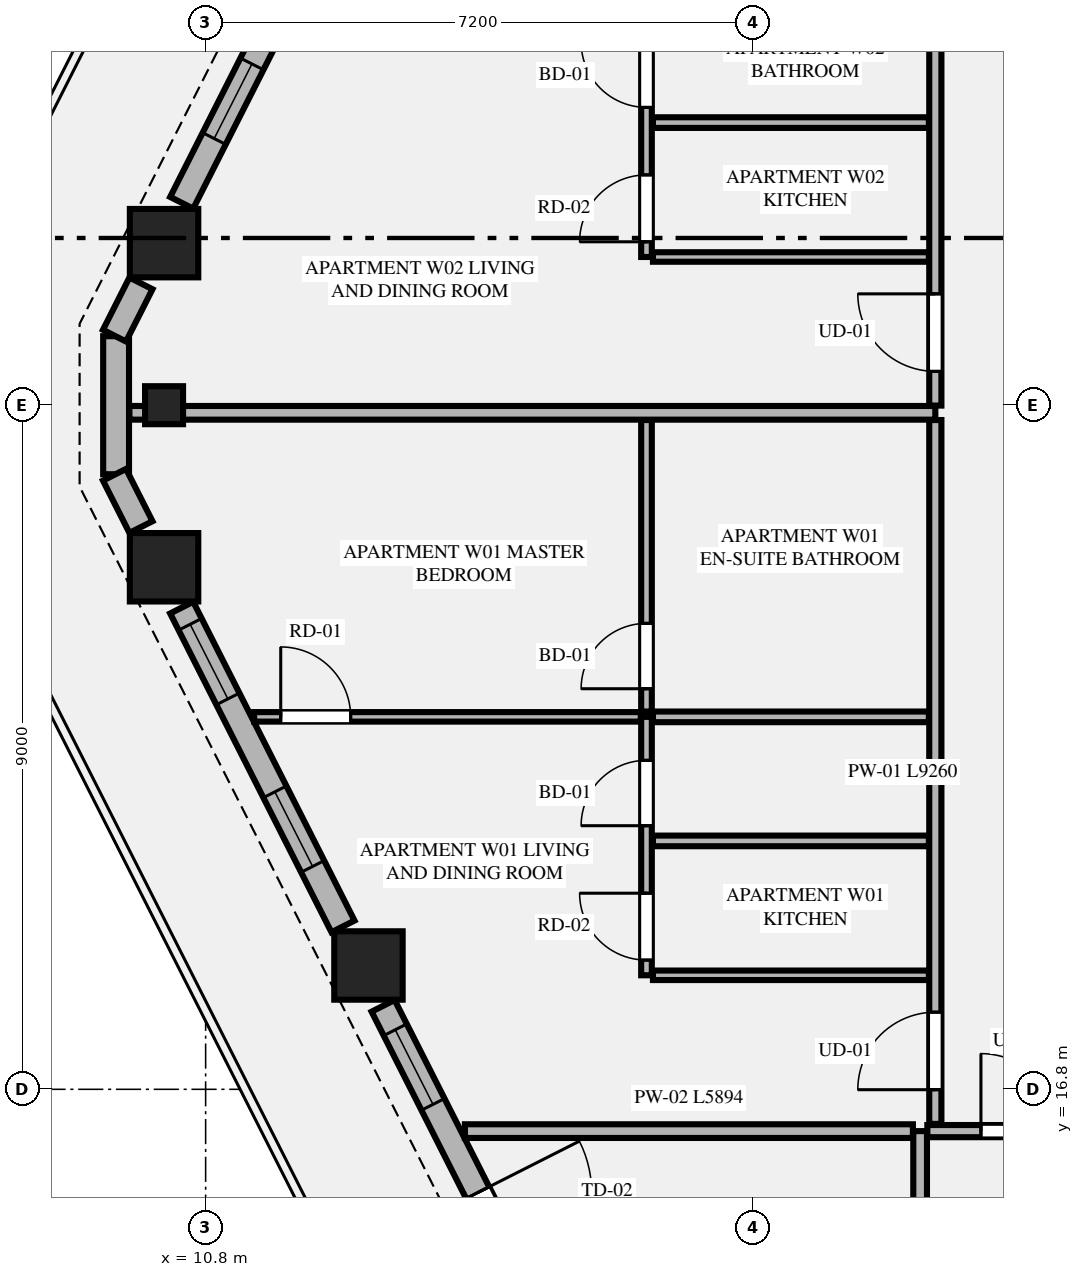
"""IFC4 building model, lengths in metres.
Left out: names, types, materials, properties, quantities, classifications, styles, units other than length and angle.
Written with IfcOpenShell. Run it as: python <this file> out.ifc"""

import sys

from ifc_helpers import new_model, si_unit, direction, frame, frame_2d, origin, origin_2d, place, context, subcontext, project, spatial, rectangle, extrude, element, fill, save


model = new_model("IFC4")
c1 = context("Model", 3, precision=1e-05, world=origin(), true_north=direction((0.0, 1.0)))
c2 = subcontext(c1, "Body", "Model", "MODEL_VIEW")
j1 = project(units=[si_unit("LENGTHUNIT", "METRE"), si_unit("PLANEANGLEUNIT", "RADIAN")], contexts=[c1])
p1 = place(None, origin())
s1 = spatial("IfcSite", under=j1, at=p1, CompositionType="ELEMENT")
p2 = place(p1, origin())
s2 = spatial("IfcBuilding", under=s1, at=p2, CompositionType="ELEMENT")
p3 = place(p2, frame((0.0, 0.0, 171.9)))
s3 = spatial("IfcBuildingStorey", under=s2, at=p3, CompositionType="ELEMENT", Elevation=171.9)
for number, where, z_axis, x_axis in (
    (1, (10.253, 27.932, 0.0), (0.0, 0.0, 1.0), (1.0, 0.0, 0.0)),
    (2, (10.253, 23.668, 0.0), (0.0, 0.0, 1.0), (1.0, 0.0, 0.0)),
    (3, (12.942, 18.429, 0.0), (0.0, 0.0, 1.0), (1.0, 0.0, 0.0)),
):
    element("IfcColumn", number, at=place(p3, frame(where, z_axis=z_axis, x_axis=x_axis)), inside=s3, PredefinedType="COLUMN", context=c2, shape_type="SweptSolid", body=[
        extrude(rectangle(XDim=0.9, YDim=0.9, at=origin_2d()), origin(), (0.0, 0.0, 1.0), 3.55),
    ])
p4 = place(p3, frame((10.253, 25.8, 0.0), z_axis=(0.0, 0.0, 1.0), x_axis=(0.0, -1.0, 0.0)))
e4 = element("IfcColumn", 4, at=p4, inside=s3, PredefinedType="PILASTER", context=c2, shape_type="SweptSolid", body=[
    extrude(rectangle(XDim=0.5, YDim=0.35, at=origin_2d()), origin(), (0.0, 0.0, 1.0), 3.55),
])
p5 = place(p3, frame((9.622, 26.708, 0.0), z_axis=(0.0, 0.0, 1.0), x_axis=(0.0, -1.0, 0.0)))
e5 = element("IfcWall", 5, at=p5, inside=s3, PredefinedType="STANDARD", context=c2, shape_type="SweptSolid", body=[
    extrude(rectangle(XDim=1.816, YDim=0.34, at=frame_2d((0.908, 0.0))), origin(), (0.0, 0.0, 1.0), 3.35),
])
p6 = place(p3, frame((12.607, 32.657, 0.0), z_axis=(0.0, 0.0, 1.0), x_axis=(-0.451426298588, -0.892308409096, 0.0)))
e6 = element("IfcWall", 6, at=p6, inside=s3, PredefinedType="STANDARD", context=c2, shape_type="SweptSolid", body=[
    extrude(rectangle(XDim=4.7, YDim=0.34, at=frame_2d((2.35, 0.0))), origin(), (0.0, 0.0, 1.0), 2.883),
])
p7 = place(p6, frame((0.22, 0.0, 0.75)))
e7 = element("IfcOpeningElement", 7, at=p7, cuts=e6, PredefinedType="OPENING", context=c2, shape_type="SweptSolid", body=[
    extrude(rectangle(XDim=1.027, YDim=1.983, at=frame_2d((0.514, 0.991))), frame((0.0, 0.18, 0.0), z_axis=(0.0, -1.0, 0.0), x_axis=(1.0, 0.0, 0.0)), (0.0, 0.0, 1.0), 0.36),
])
p8 = place(p6, frame((2.653, 0.0, 0.75)))
e8 = element("IfcOpeningElement", 8, at=p8, cuts=e6, PredefinedType="OPENING", context=c2, shape_type="SweptSolid", body=[
    extrude(rectangle(XDim=1.1, YDim=1.983, at=frame_2d((0.55, 0.991))), frame((0.0, 0.18, 0.0), z_axis=(0.0, -1.0, 0.0), x_axis=(1.0, 0.0, 0.0)), (0.0, 0.0, 1.0), 0.36),
])
for number, where, z_axis, x_axis in (
    (9, (9.949, 27.403, 0.0), (0.0, 0.0, 1.0), (-0.451, -0.892, 0.0)),
    (10, (9.601, 24.885, 0.0), (0.0, 0.0, 1.0), (0.451, -0.892, 0.0)),
):
    element("IfcWall", number, at=place(p3, frame(where, z_axis=z_axis, x_axis=x_axis)), inside=s3, PredefinedType="STANDARD", context=c2, shape_type="SweptSolid", body=[
        extrude(rectangle(XDim=0.771, YDim=0.34, at=frame_2d((0.385, 0.0))), origin(), (0.0, 0.0, 1.0), 3.35),
    ])
p9 = place(p3, frame((10.485, 23.137, 0.0), z_axis=(0.0, 0.0, 1.0), x_axis=(0.451447222193, -0.892297823361, 0.0)))
e11 = element("IfcWall", 11, at=p9, inside=s3, PredefinedType="STANDARD", context=c2, shape_type="SweptSolid", body=[
    extrude(rectangle(XDim=4.7, YDim=0.34, at=frame_2d((2.35, 0.0))), origin(), (0.0, 0.0, 1.0), 2.883),
])
p10 = place(p9, frame((0.246, 0.0, 0.75)))
e12 = element("IfcOpeningElement", 12, at=p10, cuts=e11, PredefinedType="OPENING", context=c2, shape_type="SweptSolid", body=[
    extrude(rectangle(XDim=1.1, YDim=1.983, at=frame_2d((0.55, 0.991))), frame((0.0, 0.18, 0.0), z_axis=(0.0, -1.0, 0.0), x_axis=(1.0, 0.0, 0.0)), (0.0, 0.0, 1.0), 0.36),
])
p11 = place(p9, frame((2.716, 0.0, 0.75)))
e13 = element("IfcOpeningElement", 13, at=p11, cuts=e11, PredefinedType="OPENING", context=c2, shape_type="SweptSolid", body=[
    extrude(rectangle(XDim=1.1, YDim=1.983, at=frame_2d((0.55, 0.991))), frame((0.0, 0.18, 0.0), z_axis=(0.0, -1.0, 0.0), x_axis=(1.0, 0.0, 0.0)), (0.0, 0.0, 1.0), 0.36),
])
p12 = place(p3, frame((13.135, 17.898, 0.0), z_axis=(0.0, 0.0, 1.0), x_axis=(0.451544279509, -0.892248711763, 0.0)))
e14 = element("IfcWall", 14, at=p12, inside=s3, PredefinedType="STANDARD", context=c2, shape_type="SweptSolid", body=[
    extrude(rectangle(XDim=4.91, YDim=0.34, at=frame_2d((2.455, 0.0))), origin(), (0.0, 0.0, 1.0), 2.883),
])
p13 = place(p12, frame((2.754, 0.0, 0.0)))
e15 = element("IfcOpeningElement", 15, at=p13, cuts=e14, PredefinedType="OPENING", context=c2, shape_type="SweptSolid", body=[
    extrude(rectangle(XDim=1.5, YDim=2.3, at=frame_2d((0.75, 1.15))), frame((0.0, 0.18, 0.0), z_axis=(0.0, -1.0, 0.0), x_axis=(1.0, 0.0, 0.0)), (0.0, 0.0, 1.0), 0.36),
])
p14 = place(p12, frame((0.353, 0.0, 0.75)))
e16 = element("IfcOpeningElement", 16, at=p14, cuts=e14, PredefinedType="OPENING", context=c2, shape_type="SweptSolid", body=[
    extrude(rectangle(XDim=1.1, YDim=1.983, at=frame_2d((0.55, 0.991))), frame((0.0, 0.18, 0.0), z_axis=(0.0, -1.0, 0.0), x_axis=(1.0, 0.0, 0.0)), (0.0, 0.0, 1.0), 0.36),
])
p15 = place(p3, frame((20.2, 5.968, 0.0), z_axis=(0.0, 0.0, 1.0), x_axis=(0.0, 1.0, 0.0)))
e17 = element("IfcWall", 17, at=p15, inside=s3, PredefinedType="PARTITIONING", context=c2, shape_type="SweptSolid", body=[
    extrude(rectangle(XDim=10.282, YDim=0.18, at=frame_2d((5.141, 0.0))), origin(), (0.0, 0.0, 1.0), 3.35),
])
p16 = place(p3, frame((20.295, 16.25, 0.0), z_axis=(0.0, 0.0, 1.0), x_axis=(1.0, 0.0, 0.0)))
e18 = element("IfcWall", 18, at=p16, inside=s3, PredefinedType="PARTITIONING", context=c2, shape_type="SweptSolid", body=[
    extrude(rectangle(XDim=8.467, YDim=0.16, at=frame_2d((4.233, 0.0))), origin(), (0.0, 0.0, 1.0), 3.35),
])
p17 = place(p16, frame((0.705, 0.0, 0.0)))
e19 = element("IfcOpeningElement", 19, at=p17, cuts=e18, PredefinedType="OPENING", context=c2, shape_type="SweptSolid", body=[
    extrude(rectangle(XDim=1.02, YDim=2.25, at=frame_2d((0.51, 1.125))), frame((0.0, 0.09, 0.0), z_axis=(0.0, -1.0, 0.0), x_axis=(1.0, 0.0, 0.0)), (0.0, 0.0, 1.0), 0.18),
])
p18 = place(p3, frame((14.211, 16.25, 0.0), z_axis=(0.0, 0.0, 1.0), x_axis=(1.0, 0.0, 0.0)))
e20 = element("IfcWall", 20, at=p18, inside=s3, PredefinedType="PARTITIONING", context=c2, shape_type="SweptSolid", body=[
    extrude(rectangle(XDim=5.894, YDim=0.18, at=frame_2d((2.947, 0.0))), origin(), (0.0, 0.0, 1.0), 3.35),
])
p19 = place(p3, frame((20.4, 16.345, 0.0), z_axis=(0.0, 0.0, 1.0), x_axis=(0.0, 1.0, 0.0)))
e21 = element("IfcWall", 21, at=p19, inside=s3, PredefinedType="PARTITIONING", context=c2, shape_type="SweptSolid", body=[
    extrude(rectangle(XDim=9.26, YDim=0.16, at=frame_2d((4.63, 0.0))), origin(), (0.0, 0.0, 1.0), 3.35),
])
p20 = place(p19, frame((0.45, 0.0, 0.0)))
e22 = element("IfcOpeningElement", 22, at=p20, cuts=e21, PredefinedType="OPENING", context=c2, shape_type="SweptSolid", body=[
    extrude(rectangle(XDim=1.02, YDim=2.25, at=frame_2d((0.51, 1.125))), frame((0.0, 0.09, 0.0), z_axis=(0.0, -1.0, 0.0), x_axis=(1.0, 0.0, 0.0)), (0.0, 0.0, 1.0), 0.18),
])
p21 = place(p3, frame((16.685, 18.3, 0.0), z_axis=(0.0, 0.0, 1.0), x_axis=(1.0, 0.0, 0.0)))
e23 = element("IfcWall", 23, at=p21, inside=s3, PredefinedType="PARTITIONING", context=c2, shape_type="SweptSolid", body=[
    extrude(rectangle(XDim=3.63, YDim=0.125, at=frame_2d((1.815, 0.0))), origin(), (0.0, 0.0, 1.0), 2.807),
])
p22 = place(p3, frame((16.6, 18.3, 0.0), z_axis=(0.0, 0.0, 1.0), x_axis=(0.0, 1.0, 0.0)))
e24 = element("IfcWall", 24, at=p22, inside=s3, PredefinedType="PLUMBINGWALL", context=c2, shape_type="SweptSolid", body=[
    extrude(rectangle(XDim=3.4, YDim=0.14, at=frame_2d((1.7, 0.0))), origin(), (0.0, 0.0, 1.0), 3.35),
])
p23 = place(p22, frame((0.2, 0.0, 0.0)))
e25 = element("IfcOpeningElement", 25, at=p23, cuts=e24, PredefinedType="OPENING", context=c2, shape_type="SweptSolid", body=[
    extrude(rectangle(XDim=0.88, YDim=2.15, at=frame_2d((0.44, 1.075))), frame((0.0, 0.08, 0.0), z_axis=(0.0, -1.0, 0.0), x_axis=(1.0, 0.0, 0.0)), (0.0, 0.0, 1.0), 0.16),
])
p24 = place(p22, frame((1.968, 0.0, 0.0)))
e26 = element("IfcOpeningElement", 26, at=p24, cuts=e24, PredefinedType="OPENING", context=c2, shape_type="SweptSolid", body=[
    extrude(rectangle(XDim=0.86, YDim=2.1, at=frame_2d((0.43, 1.05))), frame((0.0, 0.08, 0.0), z_axis=(0.0, -1.0, 0.0), x_axis=(1.0, 0.0, 0.0)), (0.0, 0.0, 1.0), 0.16),
])
p25 = place(p3, frame((16.6, 21.77, 0.0), z_axis=(0.0, 0.0, 1.0), x_axis=(0.0, 1.0, 0.0)))
e27 = element("IfcWall", 27, at=p25, inside=s3, PredefinedType="PLUMBINGWALL", context=c2, shape_type="SweptSolid", body=[
    extrude(rectangle(XDim=3.835, YDim=0.14, at=frame_2d((1.917, 0.0))), origin(), (0.0, 0.0, 1.0), 3.35),
])
p26 = place(p25, frame((0.3, 0.0, 0.0)))
e28 = element("IfcOpeningElement", 28, at=p26, cuts=e27, PredefinedType="OPENING", context=c2, shape_type="SweptSolid", body=[
    extrude(rectangle(XDim=0.86, YDim=2.1, at=frame_2d((0.43, 1.05))), frame((0.0, 0.08, 0.0), z_axis=(0.0, -1.0, 0.0), x_axis=(1.0, 0.0, 0.0)), (0.0, 0.0, 1.0), 0.16),
])
p27 = place(p3, frame((16.685, 21.7, 0.0), z_axis=(0.0, 0.0, 1.0), x_axis=(1.0, 0.0, 0.0)))
e29 = element("IfcWall", 29, at=p27, inside=s3, PredefinedType="PLUMBINGWALL", context=c2, shape_type="SweptSolid", body=[
    extrude(rectangle(XDim=3.63, YDim=0.14, at=frame_2d((1.815, 0.0))), origin(), (0.0, 0.0, 1.0), 3.35),
])
p28 = place(p3, frame((11.438, 21.7, 0.0), z_axis=(0.0, 0.0, 1.0), x_axis=(1.0, 0.0, 0.0)))
e30 = element("IfcWall", 30, at=p28, inside=s3, PredefinedType="PARTITIONING", context=c2, shape_type="SweptSolid", body=[
    extrude(rectangle(XDim=5.087, YDim=0.125, at=frame_2d((2.543, 0.0))), origin(), (0.0, 0.0, 1.0), 3.35),
])
p29 = place(p28, frame((0.35, 0.0, 0.0)))
e31 = element("IfcOpeningElement", 31, at=p29, cuts=e30, PredefinedType="OPENING", context=c2, shape_type="SweptSolid", body=[
    extrude(rectangle(XDim=0.92, YDim=2.15, at=frame_2d((0.46, 1.075))), frame((0.0, 0.073, 0.0), z_axis=(0.0, -1.0, 0.0), x_axis=(1.0, 0.0, 0.0)), (0.0, 0.0, 1.0), 0.145),
])
p30 = place(p3, frame((16.685, 20.068, 0.0), z_axis=(0.0, 0.0, 1.0), x_axis=(1.0, 0.0, 0.0)))
e32 = element("IfcWall", 32, at=p30, inside=s3, PredefinedType="PLUMBINGWALL", context=c2, shape_type="SweptSolid", body=[
    extrude(rectangle(XDim=3.63, YDim=0.14, at=frame_2d((1.815, 0.0))), origin(), (0.0, 0.0, 1.0), 3.35),
])
p31 = place(p3, frame((9.797, 25.7, 0.0), z_axis=(0.0, 0.0, 1.0), x_axis=(1.0, 0.0, 0.0)))
e33 = element("IfcWall", 33, at=p31, inside=s3, PredefinedType="PARTITIONING", context=c2, shape_type="SweptSolid", body=[
    extrude(rectangle(XDim=10.603, YDim=0.18, at=frame_2d((5.301, 0.0))), origin(), (0.0, 0.0, 1.0), 3.35),
])
p32 = place(p3, frame((20.4, 25.795, 0.0), z_axis=(0.0, 0.0, 1.0), x_axis=(0.0, 1.0, 0.0)))
e34 = element("IfcWall", 34, at=p32, inside=s3, PredefinedType="PARTITIONING", context=c2, shape_type="SweptSolid", body=[
    extrude(rectangle(XDim=9.26, YDim=0.16, at=frame_2d((4.63, 0.0))), origin(), (0.0, 0.0, 1.0), 3.35),
])
p33 = place(p32, frame((0.45, 0.0, 0.0)))
e35 = element("IfcOpeningElement", 35, at=p33, cuts=e34, PredefinedType="OPENING", context=c2, shape_type="SweptSolid", body=[
    extrude(rectangle(XDim=1.02, YDim=2.25, at=frame_2d((0.51, 1.125))), frame((0.0, 0.09, 0.0), z_axis=(0.0, -1.0, 0.0), x_axis=(1.0, 0.0, 0.0)), (0.0, 0.0, 1.0), 0.18),
])
p34 = place(p3, frame((16.685, 27.75, 0.0), z_axis=(0.0, 0.0, 1.0), x_axis=(1.0, 0.0, 0.0)))
e36 = element("IfcWall", 36, at=p34, inside=s3, PredefinedType="PARTITIONING", context=c2, shape_type="SweptSolid", body=[
    extrude(rectangle(XDim=3.63, YDim=0.125, at=frame_2d((1.815, 0.0))), origin(), (0.0, 0.0, 1.0), 3.35),
])
p35 = place(p3, frame((16.6, 27.75, 0.0), z_axis=(0.0, 0.0, 1.0), x_axis=(0.0, 1.0, 0.0)))
e37 = element("IfcWall", 37, at=p35, inside=s3, PredefinedType="PLUMBINGWALL", context=c2, shape_type="SweptSolid", body=[
    extrude(rectangle(XDim=3.4, YDim=0.14, at=frame_2d((1.7, 0.0))), origin(), (0.0, 0.0, 1.0), 3.35),
])
p36 = place(p35, frame((0.2, 0.0, 0.0)))
e38 = element("IfcOpeningElement", 38, at=p36, cuts=e37, PredefinedType="OPENING", context=c2, shape_type="SweptSolid", body=[
    extrude(rectangle(XDim=0.88, YDim=2.15, at=frame_2d((0.44, 1.075))), frame((0.0, 0.08, 0.0), z_axis=(0.0, -1.0, 0.0), x_axis=(1.0, 0.0, 0.0)), (0.0, 0.0, 1.0), 0.16),
])
p37 = place(p35, frame((1.968, 0.0, 0.0)))
e39 = element("IfcOpeningElement", 39, at=p37, cuts=e37, PredefinedType="OPENING", context=c2, shape_type="SweptSolid", body=[
    extrude(rectangle(XDim=0.86, YDim=2.1, at=frame_2d((0.43, 1.05))), frame((0.0, 0.08, 0.0), z_axis=(0.0, -1.0, 0.0), x_axis=(1.0, 0.0, 0.0)), (0.0, 0.0, 1.0), 0.16),
])
p38 = place(p3, frame((16.685, 29.518, 0.0), z_axis=(0.0, 0.0, 1.0), x_axis=(1.0, 0.0, 0.0)))
e40 = element("IfcWall", 40, at=p38, inside=s3, PredefinedType="PLUMBINGWALL", context=c2, shape_type="SweptSolid", body=[
    extrude(rectangle(XDim=3.63, YDim=0.14, at=frame_2d((1.815, 0.0))), origin(), (0.0, 0.0, 1.0), 3.35),
])
p39 = place(p10, origin())
e41 = element("IfcWindow", 41, at=p39, inside=s3, PartitioningType="SINGLE_PANEL", PredefinedType="WINDOW", context=c2, shape_type="SweptSolid", body=[
    extrude(rectangle(XDim=1.1, YDim=1.983, at=frame_2d((0.55, 0.991))), frame((0.0, 0.03, 0.0), z_axis=(0.0, -1.0, 0.0), x_axis=(1.0, 0.0, 0.0)), (0.0, 0.0, 1.0), 0.06),
])
fill(e12, e41)
p40 = place(p13, origin())
e42 = element("IfcDoor", 42, at=p40, inside=s3, OperationType="SINGLE_SWING_LEFT", PredefinedType="DOOR", context=c2, shape_type="SweptSolid", body=[
    extrude(rectangle(XDim=1.5, YDim=2.3, at=frame_2d((0.75, 1.15))), frame((0.0, 0.025, 0.0), z_axis=(0.0, -1.0, 0.0), x_axis=(1.0, 0.0, 0.0)), (0.0, 0.0, 1.0), 0.05),
])
fill(e15, e42)
p41 = place(p17, origin())
e43 = element("IfcDoor", 43, at=p41, inside=s3, OperationType="SINGLE_SWING_LEFT", PredefinedType="DOOR", context=c2, shape_type="SweptSolid", body=[
    extrude(rectangle(XDim=1.02, YDim=2.25, at=frame_2d((0.51, 1.125))), frame((0.0, 0.025, 0.0), z_axis=(0.0, -1.0, 0.0), x_axis=(1.0, 0.0, 0.0)), (0.0, 0.0, 1.0), 0.05),
])
fill(e19, e43)
p42 = place(p23, origin())
e44 = element("IfcDoor", 44, at=p42, inside=s3, OperationType="SINGLE_SWING_RIGHT", PredefinedType="DOOR", context=c2, shape_type="SweptSolid", body=[
    extrude(rectangle(XDim=0.88, YDim=2.15, at=frame_2d((0.44, 1.075))), frame((0.0, 0.025, 0.0), z_axis=(0.0, -1.0, 0.0), x_axis=(1.0, 0.0, 0.0)), (0.0, 0.0, 1.0), 0.05),
])
fill(e25, e44)
p43 = place(p24, origin())
e45 = element("IfcDoor", 45, at=p43, inside=s3, OperationType="SINGLE_SWING_LEFT", PredefinedType="DOOR", context=c2, shape_type="SweptSolid", body=[
    extrude(rectangle(XDim=0.86, YDim=2.1, at=frame_2d((0.43, 1.05))), frame((0.0, 0.025, 0.0), z_axis=(0.0, -1.0, 0.0), x_axis=(1.0, 0.0, 0.0)), (0.0, 0.0, 1.0), 0.05),
])
fill(e26, e45)
p44 = place(p26, origin())
e46 = element("IfcDoor", 46, at=p44, inside=s3, OperationType="SINGLE_SWING_LEFT", PredefinedType="DOOR", context=c2, shape_type="SweptSolid", body=[
    extrude(rectangle(XDim=0.86, YDim=2.1, at=frame_2d((0.43, 1.05))), frame((0.0, 0.025, 0.0), z_axis=(0.0, -1.0, 0.0), x_axis=(1.0, 0.0, 0.0)), (0.0, 0.0, 1.0), 0.05),
])
fill(e28, e46)
p45 = place(p20, origin())
e47 = element("IfcDoor", 47, at=p45, inside=s3, OperationType="SINGLE_SWING_LEFT", PredefinedType="DOOR", context=c2, shape_type="SweptSolid", body=[
    extrude(rectangle(XDim=1.02, YDim=2.25, at=frame_2d((0.51, 1.125))), frame((0.0, 0.025, 0.0), z_axis=(0.0, -1.0, 0.0), x_axis=(1.0, 0.0, 0.0)), (0.0, 0.0, 1.0), 0.05),
])
fill(e22, e47)
p46 = place(p29, origin())
e48 = element("IfcDoor", 48, at=p46, inside=s3, OperationType="SINGLE_SWING_LEFT", PredefinedType="DOOR", context=c2, shape_type="SweptSolid", body=[
    extrude(rectangle(XDim=0.92, YDim=2.15, at=frame_2d((0.46, 1.075))), frame((0.0, 0.025, 0.0), z_axis=(0.0, -1.0, 0.0), x_axis=(1.0, 0.0, 0.0)), (0.0, 0.0, 1.0), 0.05),
])
fill(e31, e48)
p47 = place(p36, origin())
e49 = element("IfcDoor", 49, at=p47, inside=s3, OperationType="SINGLE_SWING_LEFT", PredefinedType="DOOR", context=c2, shape_type="SweptSolid", body=[
    extrude(rectangle(XDim=0.88, YDim=2.15, at=frame_2d((0.44, 1.075))), frame((0.0, 0.025, 0.0), z_axis=(0.0, -1.0, 0.0), x_axis=(1.0, 0.0, 0.0)), (0.0, 0.0, 1.0), 0.05),
])
fill(e38, e49)
p48 = place(p37, origin())
e50 = element("IfcDoor", 50, at=p48, inside=s3, OperationType="SINGLE_SWING_RIGHT", PredefinedType="DOOR", context=c2, shape_type="SweptSolid", body=[
    extrude(rectangle(XDim=0.86, YDim=2.1, at=frame_2d((0.43, 1.05))), frame((0.0, 0.025, 0.0), z_axis=(0.0, -1.0, 0.0), x_axis=(1.0, 0.0, 0.0)), (0.0, 0.0, 1.0), 0.05),
])
fill(e39, e50)
p49 = place(p33, origin())
e51 = element("IfcDoor", 51, at=p49, inside=s3, OperationType="SINGLE_SWING_RIGHT", PredefinedType="DOOR", context=c2, shape_type="SweptSolid", body=[
    extrude(rectangle(XDim=1.02, YDim=2.25, at=frame_2d((0.51, 1.125))), frame((0.0, 0.025, 0.0), z_axis=(0.0, -1.0, 0.0), x_axis=(1.0, 0.0, 0.0)), (0.0, 0.0, 1.0), 0.05),
])
fill(e35, e51)
p50 = place(p8, origin())
e52 = element("IfcWindow", 52, at=p50, inside=s3, PartitioningType="SINGLE_PANEL", PredefinedType="WINDOW", context=c2, shape_type="SweptSolid", body=[
    extrude(rectangle(XDim=1.1, YDim=1.983, at=frame_2d((0.55, 0.991))), frame((0.0, 0.03, 0.0), z_axis=(0.0, -1.0, 0.0), x_axis=(1.0, 0.0, 0.0)), (0.0, 0.0, 1.0), 0.06),
])
fill(e8, e52)
p51 = place(p11, origin())
e53 = element("IfcWindow", 53, at=p51, inside=s3, PartitioningType="SINGLE_PANEL", PredefinedType="WINDOW", context=c2, shape_type="SweptSolid", body=[
    extrude(rectangle(XDim=1.1, YDim=1.983, at=frame_2d((0.55, 0.991))), frame((0.0, 0.03, 0.0), z_axis=(0.0, -1.0, 0.0), x_axis=(1.0, 0.0, 0.0)), (0.0, 0.0, 1.0), 0.06),
])
fill(e13, e53)
p52 = place(p14, origin())
e54 = element("IfcWindow", 54, at=p52, inside=s3, PartitioningType="SINGLE_PANEL", PredefinedType="WINDOW", context=c2, shape_type="SweptSolid", body=[
    extrude(rectangle(XDim=1.1, YDim=1.983, at=frame_2d((0.55, 0.991))), frame((0.0, 0.03, 0.0), z_axis=(0.0, -1.0, 0.0), x_axis=(1.0, 0.0, 0.0)), (0.0, 0.0, 1.0), 0.06),
])
fill(e16, e54)
save(model, sys.argv[1])
